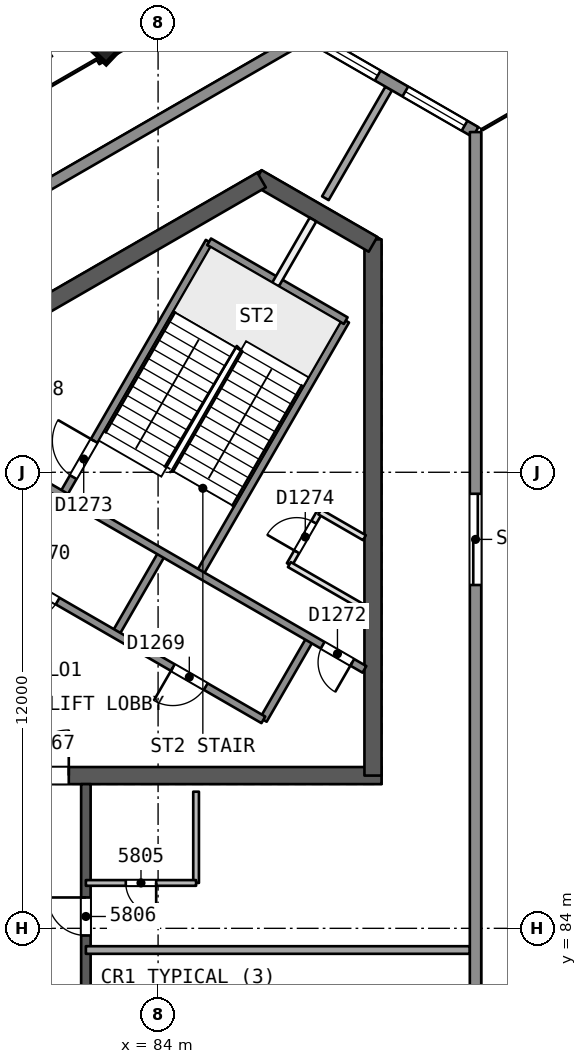
"""IFC4 building model, lengths in metres.
Left out: names, types, materials, properties, quantities, classifications, styles, units other than length and angle.
Written with IfcOpenShell. Run it as: python <this file> out.ifc"""

import sys

from ifc_helpers import new_model, si_unit, direction, frame, frame_2d, origin, origin_2d, place, context, subcontext, project, spatial, rectangle, extrude, element, fill, save


model = new_model("IFC4")
c1 = context("Model", 3, precision=1e-05, world=origin(), true_north=direction((0.0, 1.0)))
c2 = subcontext(c1, "Body", "Model", "MODEL_VIEW")
j1 = project(units=[si_unit("LENGTHUNIT", "METRE"), si_unit("PLANEANGLEUNIT", "RADIAN")], contexts=[c1])
p1 = place(None, origin())
s1 = spatial("IfcSite", under=j1, at=p1, CompositionType="ELEMENT")
p2 = place(p1, origin())
s2 = spatial("IfcBuilding", under=s1, at=p2, CompositionType="ELEMENT")
p3 = place(p2, frame((0.0, 0.0, 235.4)))
s3 = spatial("IfcBuildingStorey", under=s2, at=p3, CompositionType="ELEMENT", Elevation=235.4)
p4 = place(p3, frame((79.63, 88.019, 0.0), z_axis=(0.0, 0.0, 1.0), x_axis=(1.0, 0.0, 0.0)))
e1 = element("IfcWall", 1, at=p4, inside=s3, PredefinedType="SHEAR", context=c2, shape_type="SweptSolid", body=[
    extrude(rectangle(XDim=10.25, YDim=0.45, at=frame_2d((5.125, 0.0))), origin(), (0.0, 0.0, 1.0), 3.7),
])
p5 = place(p4, frame((0.82, 0.0, 0.0)))
e2 = element("IfcOpeningElement", 2, at=p5, cuts=e1, PredefinedType="OPENING", context=c2, shape_type="SweptSolid", body=[
    extrude(rectangle(XDim=1.2, YDim=2.1, at=frame_2d((0.6, 1.05))), frame((0.0, 0.235, 0.0), z_axis=(0.0, -1.0, 0.0), x_axis=(1.0, 0.0, 0.0)), (0.0, 0.0, 1.0), 0.471),
])
p6 = place(p3, frame((89.655, 88.019, 0.0), z_axis=(0.0, 0.0, 1.0), x_axis=(0.0, 1.0, 0.0)))
e3 = element("IfcWall", 3, at=p6, inside=s3, PredefinedType="SHEAR", context=c2, shape_type="SweptSolid", body=[
    extrude(rectangle(XDim=14.108, YDim=0.45, at=frame_2d((7.054, 0.0))), origin(), (0.0, 0.0, 1.0), 3.7),
])
p7 = place(p3, frame((89.655, 101.998, 0.0), z_axis=(0.0, 0.0, 1.0), x_axis=(-0.866042179588, 0.49997094233, 0.0)))
e4 = element("IfcWall", 4, at=p7, inside=s3, PredefinedType="SHEAR", context=c2, shape_type="SweptSolid", body=[
    extrude(rectangle(XDim=3.515, YDim=0.45, at=frame_2d((1.758, 0.0))), origin(), (0.0, 0.0, 1.0), 3.7),
])
p8 = place(p3, frame((86.723, 103.69, 0.0), z_axis=(0.0, 0.0, 1.0), x_axis=(-0.866022713978, -0.500004658852, 0.0)))
e5 = element("IfcWall", 5, at=p8, inside=s3, PredefinedType="SHEAR", context=c2, shape_type="SweptSolid", body=[
    extrude(rectangle(XDim=14.203, YDim=0.45, at=frame_2d((7.102, 0.0))), origin(), (0.0, 0.0, 1.0), 3.7),
])
p9 = place(p3, frame((82.1, 72.206, 0.0), z_axis=(0.0, 0.0, 1.0), x_axis=(0.0, 1.0, 0.0)))
e6 = element("IfcWall", 6, at=p9, inside=s3, PredefinedType="SHEAR", context=c2, shape_type="SweptSolid", body=[
    extrude(rectangle(XDim=15.588, YDim=0.25, at=frame_2d((7.794, 0.0))), origin(), (0.0, 0.0, 1.0), 3.3),
])
p10 = place(p9, frame((2.15, 0.0, 0.0)))
e7 = element("IfcOpeningElement", 7, at=p10, cuts=e6, PredefinedType="OPENING", context=c2, shape_type="SweptSolid", body=[
    extrude(rectangle(XDim=1.0, YDim=2.1, at=frame_2d((0.5, 1.05))), frame((0.0, 0.135, 0.0), z_axis=(0.0, -1.0, 0.0), x_axis=(1.0, 0.0, 0.0)), (0.0, 0.0, 1.0), 0.271),
])
p11 = place(p9, frame((7.662, 0.0, 0.0)))
e8 = element("IfcOpeningElement", 8, at=p11, cuts=e6, PredefinedType="OPENING", context=c2, shape_type="SweptSolid", body=[
    extrude(rectangle(XDim=1.2, YDim=2.4, at=frame_2d((0.6, 1.2))), frame((0.0, 0.135, 0.0), z_axis=(0.0, -1.0, 0.0), x_axis=(1.0, 0.0, 0.0)), (0.0, 0.0, 1.0), 0.271),
])
p12 = place(p9, frame((11.606, 0.0, 0.0)))
e9 = element("IfcOpeningElement", 9, at=p12, cuts=e6, PredefinedType="OPENING", context=c2, shape_type="SweptSolid", body=[
    extrude(rectangle(XDim=1.0, YDim=2.1, at=frame_2d((0.5, 1.05))), frame((0.0, 0.135, 0.0), z_axis=(0.0, -1.0, 0.0), x_axis=(1.0, 0.0, 0.0)), (0.0, 0.0, 1.0), 0.271),
])
p13 = place(p3, frame((91.418, 108.436, 0.0), z_axis=(-0.017605841609, -0.030529980019, 0.999378784376), x_axis=(0.866282372425, -0.499554652892, 2.36814e-07)))
e10 = element("IfcColumn", 10, at=p13, inside=s3, PredefinedType="COLUMN", context=c2, shape_type="SweptSolid", body=[
    extrude(rectangle(XDim=1.9, YDim=1.9, at=origin_2d()), origin(), (0.0, 0.0, 1.0), 3.702),
])
p14 = place(p3, frame((82.628, 107.386, 0.0), z_axis=(-0.008375902173, -0.028161497857, 0.999568293966), x_axis=(0.865850883257, 0.499846917191, 0.021337931896)))
e11 = element("IfcColumn", 11, at=p14, inside=s3, PredefinedType="COLUMN", context=c2, shape_type="SweptSolid", body=[
    extrude(rectangle(XDim=0.85, YDim=0.85, at=origin_2d()), origin(), (0.0, 0.0, 1.0), 3.702),
])
p15 = place(p3, frame((92.204, 83.429, 0.0), z_axis=(0.0, 0.0, 1.0), x_axis=(-1.0, 0.0, 0.0)))
e12 = element("IfcWall", 12, at=p15, inside=s3, PredefinedType="PARTITIONING", context=c2, shape_type="SweptSolid", body=[
    extrude(rectangle(XDim=10.104, YDim=0.2, at=frame_2d((5.052, 0.0))), origin(), (0.0, 0.0, 1.0), 3.3),
])
p16 = place(p3, frame((85.0, 87.595, 0.0), z_axis=(0.0, 0.0, 1.0), x_axis=(0.0, -1.0, 0.0)))
e13 = element("IfcWall", 13, at=p16, inside=s3, PredefinedType="PARTITIONING", context=c2, shape_type="SweptSolid", body=[
    extrude(rectangle(XDim=2.401, YDim=0.15, at=frame_2d((1.2, 0.0))), origin(), (0.0, 0.0, 1.0), 3.3),
])
p17 = place(p3, frame((85.0, 85.194, 0.0), z_axis=(0.0, 0.0, 1.0), x_axis=(-1.0, 0.0, 0.0)))
e14 = element("IfcWall", 14, at=p17, inside=s3, PredefinedType="PARTITIONING", context=c2, shape_type="SweptSolid", body=[
    extrude(rectangle(XDim=2.9, YDim=0.15, at=frame_2d((1.45, 0.0))), origin(), (0.0, 0.0, 1.0), 3.3),
])
p18 = place(p17, frame((1.05, 0.0, 0.0)))
e15 = element("IfcOpeningElement", 15, at=p18, cuts=e14, PredefinedType="OPENING", context=c2, shape_type="SweptSolid", body=[
    extrude(rectangle(XDim=0.8, YDim=2.1, at=frame_2d((0.4, 1.05))), frame((0.0, 0.085, 0.0), z_axis=(0.0, -1.0, 0.0), x_axis=(1.0, 0.0, 0.0)), (0.0, 0.0, 1.0), 0.171),
])
p19 = place(p3, frame((90.069, 106.098, 0.0), z_axis=(0.0, 0.0, 1.0), x_axis=(-0.500005547131, -0.866022201123, 0.0)))
e16 = element("IfcWall", 16, at=p19, inside=s3, PredefinedType="PARTITIONING", context=c2, shape_type="SweptSolid", body=[
    extrude(rectangle(XDim=3.334, YDim=0.2, at=frame_2d((1.667, 0.0))), origin(), (0.0, 0.0, 1.0), 3.3),
])
p20 = place(p3, frame((87.932, 107.504, 0.0), z_axis=(0.0, 0.0, 1.0), x_axis=(0.866030291356, -0.499991534382, 0.0)))
e17 = element("IfcWall", 17, at=p20, inside=s3, PredefinedType="SOLIDWALL", context=c2, shape_type="SweptSolid", body=[
    extrude(rectangle(XDim=5.105, YDim=0.3, at=frame_2d((2.552, 0.0))), origin(), (0.0, 0.0, 1.0), 3.3),
])
p21 = place(p20, frame((2.972, 0.0, 0.9)))
e18 = element("IfcOpeningElement", 18, at=p21, cuts=e17, PredefinedType="OPENING", context=c2, shape_type="SweptSolid", body=[
    extrude(rectangle(XDim=1.8, YDim=1.5, at=frame_2d((0.9, 0.75))), frame((0.0, 0.161, 0.0), z_axis=(0.0, -1.0, 0.0), x_axis=(1.0, 0.0, 0.0)), (0.0, 0.0, 1.0), 0.321),
])
p22 = place(p20, frame((0.333, 0.0, 0.9)))
e19 = element("IfcOpeningElement", 19, at=p22, cuts=e17, PredefinedType="OPENING", context=c2, shape_type="SweptSolid", body=[
    extrude(rectangle(XDim=1.8, YDim=1.5, at=frame_2d((0.9, 0.75))), frame((0.0, 0.161, 0.0), z_axis=(0.0, -1.0, 0.0), x_axis=(1.0, 0.0, 0.0)), (0.0, 0.0, 1.0), 0.321),
])
p23 = place(p3, frame((92.353, 104.952, 0.0), z_axis=(0.0, 0.0, 1.0), x_axis=(0.0, -1.0, 0.0)))
e20 = element("IfcWall", 20, at=p23, inside=s3, PredefinedType="SOLIDWALL", context=c2, shape_type="SweptSolid", body=[
    extrude(rectangle(XDim=49.903, YDim=0.3, at=frame_2d((24.952, 0.0))), origin(), (0.0, 0.0, 1.0), 3.3),
])
p24 = place(p23, frame((28.896, 0.0, 0.0)))
e21 = element("IfcOpeningElement", 21, at=p24, cuts=e20, PredefinedType="OPENING", context=c2, shape_type="SweptSolid", body=[
    extrude(rectangle(XDim=2.4, YDim=2.4, at=frame_2d((1.2, 1.2))), frame((0.0, 0.161, 0.0), z_axis=(0.0, -1.0, 0.0), x_axis=(1.0, 0.0, 0.0)), (0.0, 0.0, 1.0), 0.321),
])
p25 = place(p23, frame((38.836, 0.0, 0.0)))
e22 = element("IfcOpeningElement", 22, at=p25, cuts=e20, PredefinedType="OPENING", context=c2, shape_type="SweptSolid", body=[
    extrude(rectangle(XDim=2.4, YDim=2.4, at=frame_2d((1.2, 1.2))), frame((0.0, 0.161, 0.0), z_axis=(0.0, -1.0, 0.0), x_axis=(1.0, 0.0, 0.0)), (0.0, 0.0, 1.0), 0.321),
])
p26 = place(p23, frame((9.518, 0.0, 0.0)))
e23 = element("IfcOpeningElement", 23, at=p26, cuts=e20, PredefinedType="OPENING", context=c2, shape_type="SweptSolid", body=[
    extrude(rectangle(XDim=2.4, YDim=2.4, at=frame_2d((1.2, 1.2))), frame((0.0, 0.161, 0.0), z_axis=(0.0, -1.0, 0.0), x_axis=(1.0, 0.0, 0.0)), (0.0, 0.0, 1.0), 0.321),
])
p27 = place(p23, frame((23.284, 0.0, 0.0)))
e24 = element("IfcOpeningElement", 24, at=p27, cuts=e20, PredefinedType="OPENING", context=c2, shape_type="SweptSolid", body=[
    extrude(rectangle(XDim=2.4, YDim=2.4, at=frame_2d((1.2, 1.2))), frame((0.0, 0.161, 0.0), z_axis=(0.0, -1.0, 0.0), x_axis=(1.0, 0.0, 0.0)), (0.0, 0.0, 1.0), 0.321),
])
p28 = place(p3, frame((44.715, 82.552, 0.0), z_axis=(0.0, 0.0, 1.0), x_axis=(0.866025334516, 0.500000119977, 0.0)))
e25 = element("IfcWall", 25, at=p28, inside=s3, PredefinedType="SOLIDWALL", context=c2, shape_type="SweptSolid", body=[
    extrude(rectangle(XDim=49.903, YDim=0.3, at=frame_2d((24.952, 0.0))), origin(), (0.0, 0.0, 1.0), 3.3),
])
p29 = place(p28, frame((23.284, 0.0, 0.0)))
e26 = element("IfcOpeningElement", 26, at=p29, cuts=e25, PredefinedType="OPENING", context=c2, shape_type="SweptSolid", body=[
    extrude(rectangle(XDim=2.4, YDim=2.4, at=frame_2d((1.2, 1.2))), frame((0.0, 0.161, 0.0), z_axis=(0.0, -1.0, 0.0), x_axis=(1.0, 0.0, 0.0)), (0.0, 0.0, 1.0), 0.321),
])
p30 = place(p28, frame((37.674, 0.0, 0.0)))
e27 = element("IfcOpeningElement", 27, at=p30, cuts=e25, PredefinedType="OPENING", context=c2, shape_type="SweptSolid", body=[
    extrude(rectangle(XDim=2.4, YDim=2.4, at=frame_2d((1.2, 1.2))), frame((0.0, 0.161, 0.0), z_axis=(0.0, -1.0, 0.0), x_axis=(1.0, 0.0, 0.0)), (0.0, 0.0, 1.0), 0.321),
])
p31 = place(p28, frame((9.362, 0.0, 0.0)))
e28 = element("IfcOpeningElement", 28, at=p31, cuts=e25, PredefinedType="OPENING", context=c2, shape_type="SweptSolid", body=[
    extrude(rectangle(XDim=2.4, YDim=2.4, at=frame_2d((1.2, 1.2))), frame((0.0, 0.161, 0.0), z_axis=(0.0, -1.0, 0.0), x_axis=(1.0, 0.0, 0.0)), (0.0, 0.0, 1.0), 0.321),
])
p32 = place(p3, frame((86.77, 89.486, 0.0), z_axis=(0.0, 0.0, 1.0), x_axis=(0.499961042966, 0.86604789447, 0.0)))
e29 = element("IfcWall", 29, at=p32, inside=s3, PredefinedType="SOLIDWALL", context=c2, shape_type="SweptSolid", body=[
    extrude(rectangle(XDim=2.48, YDim=0.2, at=frame_2d((1.24, 0.0))), origin(), (0.0, 0.0, 1.0), 3.3),
])
p33 = place(p3, frame((87.454, 93.571, 0.0), z_axis=(0.0, 0.0, 1.0), x_axis=(0.499995408039, 0.866028054938, 0.0)))
e30 = element("IfcWall", 30, at=p33, inside=s3, PredefinedType="PARTITIONING", context=c2, shape_type="SweptSolid", body=[
    extrude(rectangle(XDim=1.6, YDim=0.15, at=frame_2d((0.8, 0.0))), origin(), (0.0, 0.0, 1.0), 3.3),
])
p34 = place(p33, frame((0.387, 0.0, 0.0)))
e31 = element("IfcOpeningElement", 31, at=p34, cuts=e30, PredefinedType="OPENING", context=c2, shape_type="SweptSolid", body=[
    extrude(rectangle(XDim=0.9, YDim=2.1, at=frame_2d((0.45, 1.05))), frame((0.0, 0.085, 0.0), z_axis=(0.0, -1.0, 0.0), x_axis=(1.0, 0.0, 0.0)), (0.0, 0.0, 1.0), 0.171),
])
p35 = place(p3, frame((85.087, 93.321, 0.0), z_axis=(0.0, 0.0, 1.0), x_axis=(0.500019787375, 0.866013979237, 0.0)))
e32 = element("IfcWall", 32, at=p35, inside=s3, PredefinedType="SOLIDWALL", context=c2, shape_type="SweptSolid", body=[
    extrude(rectangle(XDim=7.7, YDim=0.2, at=frame_2d((3.85, 0.0))), origin(), (0.0, 0.0, 1.0), 3.3),
])
p36 = place(p3, frame((82.873, 91.736, 0.0), z_axis=(0.0, 0.0, 1.0), x_axis=(0.499961042966, 0.86604789447, 0.0)))
e33 = element("IfcWall", 33, at=p36, inside=s3, PredefinedType="SOLIDWALL", context=c2, shape_type="SweptSolid", body=[
    extrude(rectangle(XDim=2.48, YDim=0.2, at=frame_2d((1.24, 0.0))), origin(), (0.0, 0.0, 1.0), 3.3),
])
p37 = place(p3, frame((87.09, 100.94, 0.0), z_axis=(0.0, 0.0, 1.0), x_axis=(0.500011643316, 0.866018681408, 0.0)))
e34 = element("IfcWall", 34, at=p37, inside=s3, PredefinedType="PARTITIONING", context=c2, shape_type="SweptSolid", body=[
    extrude(rectangle(XDim=1.973, YDim=0.2, at=frame_2d((0.987, 0.0))), origin(), (0.0, 0.0, 1.0), 3.3),
])
p38 = place(p3, frame((81.493, 95.396, 0.0), z_axis=(0.0, 0.0, 1.0), x_axis=(0.500006057782, 0.866021906294, 0.0)))
e35 = element("IfcWall", 35, at=p38, inside=s3, PredefinedType="SOLIDWALL", context=c2, shape_type="SweptSolid", body=[
    extrude(rectangle(XDim=7.7, YDim=0.2, at=frame_2d((3.85, 0.0))), origin(), (0.0, 0.0, 1.0), 3.3),
])
p39 = place(p38, frame((0.55, 0.0, 0.0)))
e36 = element("IfcOpeningElement", 36, at=p39, cuts=e35, PredefinedType="OPENING", context=c2, shape_type="SweptSolid", body=[
    extrude(rectangle(XDim=1.1, YDim=2.1, at=frame_2d((0.55, 1.05))), frame((0.0, 0.11, 0.0), z_axis=(0.0, -1.0, 0.0), x_axis=(1.0, 0.0, 0.0)), (0.0, 0.0, 1.0), 0.221),
])
p40 = place(p3, frame((86.77, 89.486, 0.0), z_axis=(0.0, 0.0, 1.0), x_axis=(-0.86601811187, 0.500012629753, 0.0)))
e37 = element("IfcWall", 37, at=p40, inside=s3, PredefinedType="SOLIDWALL", context=c2, shape_type="SweptSolid", body=[
    extrude(rectangle(XDim=10.9, YDim=0.2, at=frame_2d((5.45, 0.0))), origin(), (0.0, 0.0, 1.0), 3.3),
])
p41 = place(p40, frame((1.75, 0.0, 0.0)))
e38 = element("IfcOpeningElement", 38, at=p41, cuts=e37, PredefinedType="OPENING", context=c2, shape_type="SweptSolid", body=[
    extrude(rectangle(XDim=1.0, YDim=2.1, at=frame_2d((0.5, 1.05))), frame((0.0, 0.11, 0.0), z_axis=(0.0, -1.0, 0.0), x_axis=(1.0, 0.0, 0.0)), (0.0, 0.0, 1.0), 0.221),
])
p42 = place(p40, frame((6.25, 0.0, 0.0)))
e39 = element("IfcOpeningElement", 39, at=p42, cuts=e37, PredefinedType="OPENING", context=c2, shape_type="SweptSolid", body=[
    extrude(rectangle(XDim=1.0, YDim=2.1, at=frame_2d((0.5, 1.05))), frame((0.0, 0.11, 0.0), z_axis=(0.0, -1.0, 0.0), x_axis=(1.0, 0.0, 0.0)), (0.0, 0.0, 1.0), 0.221),
])
p43 = place(p3, frame((89.43, 90.814, 0.0), z_axis=(0.0, 0.0, 1.0), x_axis=(-0.866018983788, 0.500011119594, 0.0)))
e40 = element("IfcWall", 40, at=p43, inside=s3, PredefinedType="SOLIDWALL", context=c2, shape_type="SweptSolid", body=[
    extrude(rectangle(XDim=10.64, YDim=0.2, at=frame_2d((5.32, 0.0))), origin(), (0.0, 0.0, 1.0), 3.3),
])
p44 = place(p43, frame((0.37, 0.0, 0.0)))
e41 = element("IfcOpeningElement", 41, at=p44, cuts=e40, PredefinedType="OPENING", context=c2, shape_type="SweptSolid", body=[
    extrude(rectangle(XDim=0.9, YDim=2.1, at=frame_2d((0.45, 1.05))), frame((0.0, 0.11, 0.0), z_axis=(0.0, -1.0, 0.0), x_axis=(1.0, 0.0, 0.0)), (0.0, 0.0, 1.0), 0.221),
])
p45 = place(p3, frame((89.43, 92.43, 0.0), z_axis=(0.0, 0.0, 1.0), x_axis=(-0.866048373726, 0.499960212783, 0.0)))
e42 = element("IfcWall", 42, at=p45, inside=s3, PredefinedType="PARTITIONING", context=c2, shape_type="SweptSolid", body=[
    extrude(rectangle(XDim=2.281, YDim=0.15, at=frame_2d((1.141, 0.0))), origin(), (0.0, 0.0, 1.0), 3.3),
])
p46 = place(p3, frame((89.43, 94.278, 0.0), z_axis=(0.0, 0.0, 1.0), x_axis=(-0.865987941628, 0.500064880745, 0.0)))
e43 = element("IfcWall", 43, at=p46, inside=s3, PredefinedType="PARTITIONING", context=c2, shape_type="SweptSolid", body=[
    extrude(rectangle(XDim=1.358, YDim=0.15, at=frame_2d((0.679, 0.0))), origin(), (0.0, 0.0, 1.0), 3.3),
])
p47 = place(p3, frame((88.937, 99.99, 0.0), z_axis=(0.0, 0.0, 1.0), x_axis=(-0.866004344652, 0.500036473714, 0.0)))
e44 = element("IfcWall", 44, at=p47, inside=s3, PredefinedType="SOLIDWALL", context=c2, shape_type="SweptSolid", body=[
    extrude(rectangle(XDim=4.15, YDim=0.2, at=frame_2d((2.075, 0.0))), origin(), (0.0, 0.0, 1.0), 3.3),
])
p48 = place(p18, origin())
e45 = element("IfcDoor", 45, at=p48, inside=s3, OperationType="SINGLE_SWING_LEFT", PredefinedType="NOTDEFINED", context=c2, shape_type="SweptSolid", body=[
    extrude(rectangle(XDim=0.8, YDim=2.1, at=frame_2d((0.4, 1.05))), frame((0.0, 0.025, 0.0), z_axis=(0.0, -1.0, 0.0), x_axis=(1.0, 0.0, 0.0)), (0.0, 0.0, 1.0), 0.05),
])
fill(e15, e45)
p49 = place(p12, origin())
e46 = element("IfcDoor", 46, at=p49, inside=s3, OperationType="SINGLE_SWING_RIGHT", PredefinedType="NOTDEFINED", context=c2, shape_type="SweptSolid", body=[
    extrude(rectangle(XDim=1.0, YDim=2.1, at=frame_2d((0.5, 1.05))), frame((0.0, 0.025, 0.0), z_axis=(0.0, -1.0, 0.0), x_axis=(1.0, 0.0, 0.0)), (0.0, 0.0, 1.0), 0.05),
])
fill(e9, e46)
p50 = place(p21, origin())
e47 = element("IfcWindow", 47, at=p50, inside=s3, PartitioningType="SINGLE_PANEL", PredefinedType="WINDOW", context=c2, shape_type="SweptSolid", body=[
    extrude(rectangle(XDim=1.8, YDim=1.5, at=frame_2d((0.9, 0.75))), frame((0.0, 0.03, 0.0), z_axis=(0.0, -1.0, 0.0), x_axis=(1.0, 0.0, 0.0)), (0.0, 0.0, 1.0), 0.06),
])
fill(e18, e47)
p51 = place(p22, origin())
e48 = element("IfcWindow", 48, at=p51, inside=s3, PartitioningType="SINGLE_PANEL", PredefinedType="WINDOW", context=c2, shape_type="SweptSolid", body=[
    extrude(rectangle(XDim=1.8, YDim=1.5, at=frame_2d((0.9, 0.75))), frame((0.0, 0.03, 0.0), z_axis=(0.0, -1.0, 0.0), x_axis=(1.0, 0.0, 0.0)), (0.0, 0.0, 1.0), 0.06),
])
fill(e19, e48)
p52 = place(p26, origin())
e49 = element("IfcDoor", 49, at=p52, inside=s3, OperationType="SLIDING_TO_LEFT", PredefinedType="NOTDEFINED", context=c2, shape_type="SweptSolid", body=[
    extrude(rectangle(XDim=2.4, YDim=2.4, at=frame_2d((1.2, 1.2))), frame((0.0, 0.025, 0.0), z_axis=(0.0, -1.0, 0.0), x_axis=(1.0, 0.0, 0.0)), (0.0, 0.0, 1.0), 0.05),
])
fill(e23, e49)
p53 = place(p5, origin())
e50 = element("IfcDoor", 50, at=p53, inside=s3, OperationType="SINGLE_SWING_RIGHT", PredefinedType="NOTDEFINED", context=c2, shape_type="SweptSolid", body=[
    extrude(rectangle(XDim=1.2, YDim=2.1, at=frame_2d((0.6, 1.05))), frame((0.0, 0.025, 0.0), z_axis=(0.0, -1.0, 0.0), x_axis=(1.0, 0.0, 0.0)), (0.0, 0.0, 1.0), 0.05),
])
fill(e2, e50)
p54 = place(p41, origin())
e51 = element("IfcDoor", 51, at=p54, inside=s3, OperationType="SINGLE_SWING_RIGHT", PredefinedType="NOTDEFINED", context=c2, shape_type="SweptSolid", body=[
    extrude(rectangle(XDim=1.0, YDim=2.1, at=frame_2d((0.5, 1.05))), frame((0.0, 0.025, 0.0), z_axis=(0.0, -1.0, 0.0), x_axis=(1.0, 0.0, 0.0)), (0.0, 0.0, 1.0), 0.05),
])
fill(e38, e51)
p55 = place(p42, origin())
e52 = element("IfcDoor", 52, at=p55, inside=s3, OperationType="SINGLE_SWING_RIGHT", PredefinedType="NOTDEFINED", context=c2, shape_type="SweptSolid", body=[
    extrude(rectangle(XDim=1.0, YDim=2.1, at=frame_2d((0.5, 1.05))), frame((0.0, 0.025, 0.0), z_axis=(0.0, -1.0, 0.0), x_axis=(1.0, 0.0, 0.0)), (0.0, 0.0, 1.0), 0.05),
])
fill(e39, e52)
p56 = place(p44, origin())
e53 = element("IfcDoor", 53, at=p56, inside=s3, OperationType="SINGLE_SWING_LEFT", PredefinedType="NOTDEFINED", context=c2, shape_type="SweptSolid", body=[
    extrude(rectangle(XDim=0.9, YDim=2.1, at=frame_2d((0.45, 1.05))), frame((0.0, 0.025, 0.0), z_axis=(0.0, -1.0, 0.0), x_axis=(1.0, 0.0, 0.0)), (0.0, 0.0, 1.0), 0.05),
])
fill(e41, e53)
p57 = place(p39, origin())
e54 = element("IfcDoor", 54, at=p57, inside=s3, OperationType="SINGLE_SWING_RIGHT", PredefinedType="NOTDEFINED", context=c2, shape_type="SweptSolid", body=[
    extrude(rectangle(XDim=1.1, YDim=2.1, at=frame_2d((0.55, 1.05))), frame((0.0, 0.025, 0.0), z_axis=(0.0, -1.0, 0.0), x_axis=(1.0, 0.0, 0.0)), (0.0, 0.0, 1.0), 0.05),
])
fill(e36, e54)
p58 = place(p34, origin())
e55 = element("IfcDoor", 55, at=p58, inside=s3, OperationType="SINGLE_SWING_LEFT", PredefinedType="NOTDEFINED", context=c2, shape_type="SweptSolid", body=[
    extrude(rectangle(XDim=0.9, YDim=2.1, at=frame_2d((0.45, 1.05))), frame((0.0, 0.025, 0.0), z_axis=(0.0, -1.0, 0.0), x_axis=(1.0, 0.0, 0.0)), (0.0, 0.0, 1.0), 0.05),
])
fill(e31, e55)
save(model, sys.argv[1])
